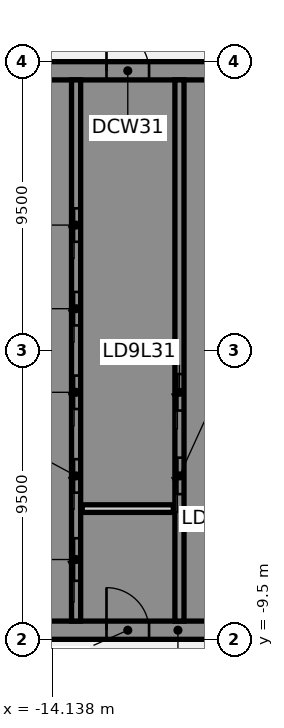
"""IFC4 building model, lengths in metres.
Left out: names, types, materials, properties, quantities, classifications, styles, units other than length and angle.
Written with IfcOpenShell. Run it as: python <this file> out.ifc"""

import sys

from ifc_helpers import new_model, si_unit, direction, frame, frame_2d, origin, place, context, subcontext, project, spatial, polyline, rectangle, outline, extrude, element, fill, save


model = new_model("IFC4")
c1 = context("Model", 3, precision=1e-05, world=origin(), true_north=direction((0.0, 1.0)))
c2 = subcontext(c1, "Body", "Model", "MODEL_VIEW")
j1 = project(units=[si_unit("LENGTHUNIT", "METRE"), si_unit("PLANEANGLEUNIT", "RADIAN")], contexts=[c1])
p1 = place(None, origin())
s1 = spatial("IfcSite", under=j1, at=p1, CompositionType="ELEMENT")
p2 = place(p1, origin())
s2 = spatial("IfcBuilding", under=s1, at=p2, CompositionType="ELEMENT")
p3 = place(p2, frame((0.0, 0.0, 128.5)))
s3 = spatial("IfcBuildingStorey", under=s2, at=p3, CompositionType="ELEMENT", Elevation=128.5)
p4 = place(p3, frame((-16.5, -9.2, 0.0), z_axis=(0.0, 0.0, 1.0), x_axis=(1.0, 0.0, 0.0)))
e1 = element("IfcWall", 1, at=p4, inside=s3, PredefinedType="SHEAR", context=c2, shape_type="SweptSolid", body=[
    extrude(rectangle(XDim=13.0, YDim=0.6, at=frame_2d((6.5, 0.0))), origin(), (0.0, 0.0, 1.0), 4.36),
])
p5 = place(p4, frame((4.15, 0.0, 0.0)))
e2 = element("IfcOpeningElement", 2, at=p5, cuts=e1, PredefinedType="OPENING", context=c2, shape_type="SweptSolid", body=[
    extrude(rectangle(XDim=1.4, YDim=2.1, at=frame_2d((0.7, 1.05))), frame((0.0, 0.31, 0.0), z_axis=(0.0, -1.0, 0.0), x_axis=(1.0, 0.0, 0.0)), (0.0, 0.0, 1.0), 0.62),
])
p6 = place(p4, frame((10.125, 0.0, 0.0)))
e3 = element("IfcOpeningElement", 3, at=p6, cuts=e1, PredefinedType="OPENING", context=c2, shape_type="SweptSolid", body=[
    extrude(rectangle(XDim=1.4, YDim=2.1, at=frame_2d((0.7, 1.05))), frame((0.0, 0.31, 0.0), z_axis=(0.0, -1.0, 0.0), x_axis=(1.0, 0.0, 0.0)), (0.0, 0.0, 1.0), 0.62),
])
p7 = place(p3, origin())
e4 = element("IfcWall", 4, at=p7, inside=s3, PredefinedType="SHEAR", context=c2, shape_type="SweptSolid", body=[
    extrude(outline(polyline([(-13.5, -8.9), (-13.5, -8.125), (-15.9, -8.125), (-15.9, -5.625), (-13.5, -5.625), (-13.5, -5.375), (-15.9, -5.375), (-15.9, -2.875), (-13.5, -2.875), (-13.5, -2.625), (-15.9, -2.625), (-15.9, -0.125), (-13.5, -0.125), (-13.5, 0.125), (-15.9, 0.125), (-15.9, 2.625), (-13.5, 2.625), (-13.5, 2.875), (-15.9, 2.875), (-15.9, 5.375), (-13.5, 5.375), (-13.5, 5.625), (-15.9, 5.625), (-15.9, 8.125), (-13.5, 8.125), (-13.5, 8.9), (-15.9, 8.9), (-16.5, 8.9), (-16.5, -8.9), (-15.9, -8.9), (-13.5, -8.9)])), origin(), (0.0, 0.0, 1.0), 4.36),
])
p8 = place(p3, frame((-16.5, 9.2, 0.0), z_axis=(0.0, 0.0, 1.0), x_axis=(1.0, 0.0, 0.0)))
e5 = element("IfcWall", 5, at=p8, inside=s3, PredefinedType="SHEAR", context=c2, shape_type="SweptSolid", body=[
    extrude(rectangle(XDim=13.0, YDim=0.6, at=frame_2d((6.5, 0.0))), origin(), (0.0, 0.0, 1.0), 4.36),
])
p9 = place(p8, frame((4.15, 0.0, 0.0)))
e6 = element("IfcOpeningElement", 6, at=p9, cuts=e5, PredefinedType="OPENING", context=c2, shape_type="SweptSolid", body=[
    extrude(rectangle(XDim=1.4, YDim=2.1, at=frame_2d((0.7, 1.05))), frame((0.0, 0.31, 0.0), z_axis=(0.0, -1.0, 0.0), x_axis=(1.0, 0.0, 0.0)), (0.0, 0.0, 1.0), 0.62),
])
p10 = place(p3, origin())
e7 = element("IfcWall", 7, at=p10, inside=s3, PredefinedType="SHEAR", context=c2, shape_type="SweptSolid", body=[
    extrude(outline(polyline([(-9.8, -5.375), (-9.8, -5.625), (-7.5, -5.625), (-7.2, -5.625), (-7.2, 8.9), (-7.5, 8.9), (-9.8, 8.9), (-9.8, 8.125), (-7.5, 8.125), (-7.5, 5.625), (-9.8, 5.625), (-9.8, 5.375), (-7.5, 5.375), (-7.5, 2.875), (-9.8, 2.875), (-9.8, 2.625), (-7.5, 2.625), (-7.5, 0.125), (-9.8, 0.125), (-9.8, -0.125), (-7.5, -0.125), (-7.5, -2.625), (-9.8, -2.625), (-9.8, -2.875), (-7.5, -2.875), (-7.5, -5.375), (-9.8, -5.375)])), origin(), (0.0, 0.0, 1.0), 4.36),
])
p11 = place(p3, origin())
e8 = element("IfcWall", 8, at=p11, inside=s3, PredefinedType="SHEAR", context=c2, shape_type="SweptSolid", body=[
    extrude(outline(polyline([(-7.5, -8.125), (-9.55, -8.125), (-9.55, -5.625), (-9.8, -5.625), (-9.8, -8.125), (-9.8, -8.9), (-7.5, -8.9), (-7.5, -8.125)])), origin(), (0.0, 0.0, 1.0), 4.36),
])
p12 = place(p3, frame((-13.35, -8.9, 0.0), z_axis=(0.0, 0.0, 1.0), x_axis=(0.0, 1.0, 0.0)))
e9 = element("IfcWall", 9, at=p12, inside=s3, PredefinedType="SHEAR", context=c2, shape_type="SweptSolid", body=[
    extrude(rectangle(XDim=17.8, YDim=0.3, at=frame_2d((8.9, 0.0))), origin(), (0.0, 0.0, 1.0), 4.36),
])
p13 = place(p12, frame((1.325, 0.0, 0.0)))
e10 = element("IfcOpeningElement", 10, at=p13, cuts=e9, PredefinedType="OPENING", context=c2, shape_type="SweptSolid", body=[
    extrude(rectangle(XDim=1.4, YDim=2.1, at=frame_2d((0.7, 1.05))), frame((0.0, 0.16, 0.0), z_axis=(0.0, -1.0, 0.0), x_axis=(1.0, 0.0, 0.0)), (0.0, 0.0, 1.0), 0.32),
])
p14 = place(p12, frame((4.225, 0.0, 0.0)))
e11 = element("IfcOpeningElement", 11, at=p14, cuts=e9, PredefinedType="OPENING", context=c2, shape_type="SweptSolid", body=[
    extrude(rectangle(XDim=1.1, YDim=2.1, at=frame_2d((0.55, 1.05))), frame((0.0, 0.16, 0.0), z_axis=(0.0, -1.0, 0.0), x_axis=(1.0, 0.0, 0.0)), (0.0, 0.0, 1.0), 0.32),
])
p15 = place(p12, frame((6.975, 0.0, 0.0)))
e12 = element("IfcOpeningElement", 12, at=p15, cuts=e9, PredefinedType="OPENING", context=c2, shape_type="SweptSolid", body=[
    extrude(rectangle(XDim=1.1, YDim=2.1, at=frame_2d((0.55, 1.05))), frame((0.0, 0.16, 0.0), z_axis=(0.0, -1.0, 0.0), x_axis=(1.0, 0.0, 0.0)), (0.0, 0.0, 1.0), 0.32),
])
p16 = place(p12, frame((9.725, 0.0, 0.0)))
e13 = element("IfcOpeningElement", 13, at=p16, cuts=e9, PredefinedType="OPENING", context=c2, shape_type="SweptSolid", body=[
    extrude(rectangle(XDim=1.1, YDim=2.1, at=frame_2d((0.55, 1.05))), frame((0.0, 0.16, 0.0), z_axis=(0.0, -1.0, 0.0), x_axis=(1.0, 0.0, 0.0)), (0.0, 0.0, 1.0), 0.32),
])
p17 = place(p12, frame((12.475, 0.0, 0.0)))
e14 = element("IfcOpeningElement", 14, at=p17, cuts=e9, PredefinedType="OPENING", context=c2, shape_type="SweptSolid", body=[
    extrude(rectangle(XDim=1.1, YDim=2.1, at=frame_2d((0.55, 1.05))), frame((0.0, 0.16, 0.0), z_axis=(0.0, -1.0, 0.0), x_axis=(1.0, 0.0, 0.0)), (0.0, 0.0, 1.0), 0.32),
])
p18 = place(p3, frame((-9.95, -8.9, 0.0), z_axis=(0.0, 0.0, 1.0), x_axis=(0.0, 1.0, 0.0)))
e15 = element("IfcWall", 15, at=p18, inside=s3, PredefinedType="SHEAR", context=c2, shape_type="SweptSolid", body=[
    extrude(rectangle(XDim=17.8, YDim=0.3, at=frame_2d((8.9, 0.0))), origin(), (0.0, 0.0, 1.0), 4.36),
])
p19 = place(p18, frame((4.175, 0.0, 0.0)))
e16 = element("IfcOpeningElement", 16, at=p19, cuts=e15, PredefinedType="OPENING", context=c2, shape_type="SweptSolid", body=[
    extrude(rectangle(XDim=1.2, YDim=2.1, at=frame_2d((0.6, 1.05))), frame((0.0, 0.16, 0.0), z_axis=(0.0, -1.0, 0.0), x_axis=(1.0, 0.0, 0.0)), (0.0, 0.0, 1.0), 0.32),
])
p20 = place(p18, frame((6.925, 0.0, 0.0)))
e17 = element("IfcOpeningElement", 17, at=p20, cuts=e15, PredefinedType="OPENING", context=c2, shape_type="SweptSolid", body=[
    extrude(rectangle(XDim=1.2, YDim=2.1, at=frame_2d((0.6, 1.05))), frame((0.0, 0.16, 0.0), z_axis=(0.0, -1.0, 0.0), x_axis=(1.0, 0.0, 0.0)), (0.0, 0.0, 1.0), 0.32),
])
p21 = place(p3, frame((-13.15, -5.2, 0.0), z_axis=(0.0, 0.0, 1.0), x_axis=(1.0, 0.0, 0.0)))
e18 = element("IfcWall", 18, at=p21, inside=s3, PredefinedType="PARTITIONING", context=c2, shape_type="SweptSolid", body=[
    extrude(rectangle(XDim=3.0, YDim=0.25, at=frame_2d((1.5, 0.0))), origin(), (0.0, 0.0, 1.0), 4.36),
])
p22 = place(p5, origin())
e19 = element("IfcDoor", 19, at=p22, inside=s3, OperationType="SINGLE_SWING_LEFT", PredefinedType="DOOR", context=c2, shape_type="SweptSolid", body=[
    extrude(rectangle(XDim=1.4, YDim=2.1, at=frame_2d((0.7, 1.05))), frame((0.0, 0.025, 0.0), z_axis=(0.0, -1.0, 0.0), x_axis=(1.0, 0.0, 0.0)), (0.0, 0.0, 1.0), 0.05),
])
fill(e2, e19)
p23 = place(p13, origin())
e20 = element("IfcDoor", 20, at=p23, inside=s3, OperationType="SLIDING_TO_LEFT", PredefinedType="DOOR", context=c2, shape_type="SweptSolid", body=[
    extrude(rectangle(XDim=1.4, YDim=2.1, at=frame_2d((0.7, 1.05))), frame((0.0, 0.025, 0.0), z_axis=(0.0, -1.0, 0.0), x_axis=(1.0, 0.0, 0.0)), (0.0, 0.0, 1.0), 0.05),
])
fill(e10, e20)
p24 = place(p14, origin())
e21 = element("IfcDoor", 21, at=p24, inside=s3, OperationType="SLIDING_TO_LEFT", PredefinedType="DOOR", context=c2, shape_type="SweptSolid", body=[
    extrude(rectangle(XDim=1.1, YDim=2.1, at=frame_2d((0.55, 1.05))), frame((0.0, 0.025, 0.0), z_axis=(0.0, -1.0, 0.0), x_axis=(1.0, 0.0, 0.0)), (0.0, 0.0, 1.0), 0.05),
])
fill(e11, e21)
p25 = place(p15, origin())
e22 = element("IfcDoor", 22, at=p25, inside=s3, OperationType="SLIDING_TO_LEFT", PredefinedType="DOOR", context=c2, shape_type="SweptSolid", body=[
    extrude(rectangle(XDim=1.1, YDim=2.1, at=frame_2d((0.55, 1.05))), frame((0.0, 0.025, 0.0), z_axis=(0.0, -1.0, 0.0), x_axis=(1.0, 0.0, 0.0)), (0.0, 0.0, 1.0), 0.05),
])
fill(e12, e22)
p26 = place(p16, origin())
e23 = element("IfcDoor", 23, at=p26, inside=s3, OperationType="SLIDING_TO_LEFT", PredefinedType="DOOR", context=c2, shape_type="SweptSolid", body=[
    extrude(rectangle(XDim=1.1, YDim=2.1, at=frame_2d((0.55, 1.05))), frame((0.0, 0.025, 0.0), z_axis=(0.0, -1.0, 0.0), x_axis=(1.0, 0.0, 0.0)), (0.0, 0.0, 1.0), 0.05),
])
fill(e13, e23)
p27 = place(p17, origin())
e24 = element("IfcDoor", 24, at=p27, inside=s3, OperationType="SLIDING_TO_LEFT", PredefinedType="DOOR", context=c2, shape_type="SweptSolid", body=[
    extrude(rectangle(XDim=1.1, YDim=2.1, at=frame_2d((0.55, 1.05))), frame((0.0, 0.025, 0.0), z_axis=(0.0, -1.0, 0.0), x_axis=(1.0, 0.0, 0.0)), (0.0, 0.0, 1.0), 0.05),
])
fill(e14, e24)
p28 = place(p19, origin())
e25 = element("IfcDoor", 25, at=p28, inside=s3, OperationType="SLIDING_TO_LEFT", PredefinedType="DOOR", context=c2, shape_type="SweptSolid", body=[
    extrude(rectangle(XDim=1.2, YDim=2.1, at=frame_2d((0.6, 1.05))), frame((0.0, 0.025, 0.0), z_axis=(0.0, -1.0, 0.0), x_axis=(1.0, 0.0, 0.0)), (0.0, 0.0, 1.0), 0.05),
])
fill(e16, e25)
p29 = place(p20, origin())
e26 = element("IfcDoor", 26, at=p29, inside=s3, OperationType="SLIDING_TO_LEFT", PredefinedType="DOOR", context=c2, shape_type="SweptSolid", body=[
    extrude(rectangle(XDim=1.2, YDim=2.1, at=frame_2d((0.6, 1.05))), frame((0.0, 0.025, 0.0), z_axis=(0.0, -1.0, 0.0), x_axis=(1.0, 0.0, 0.0)), (0.0, 0.0, 1.0), 0.05),
])
fill(e17, e26)
p30 = place(p9, origin())
e27 = element("IfcDoor", 27, at=p30, inside=s3, OperationType="SINGLE_SWING_LEFT", PredefinedType="DOOR", context=c2, shape_type="SweptSolid", body=[
    extrude(rectangle(XDim=1.4, YDim=2.1, at=frame_2d((0.7, 1.05))), frame((0.0, 0.025, 0.0), z_axis=(0.0, -1.0, 0.0), x_axis=(1.0, 0.0, 0.0)), (0.0, 0.0, 1.0), 0.05),
])
fill(e6, e27)
save(model, sys.argv[1])
